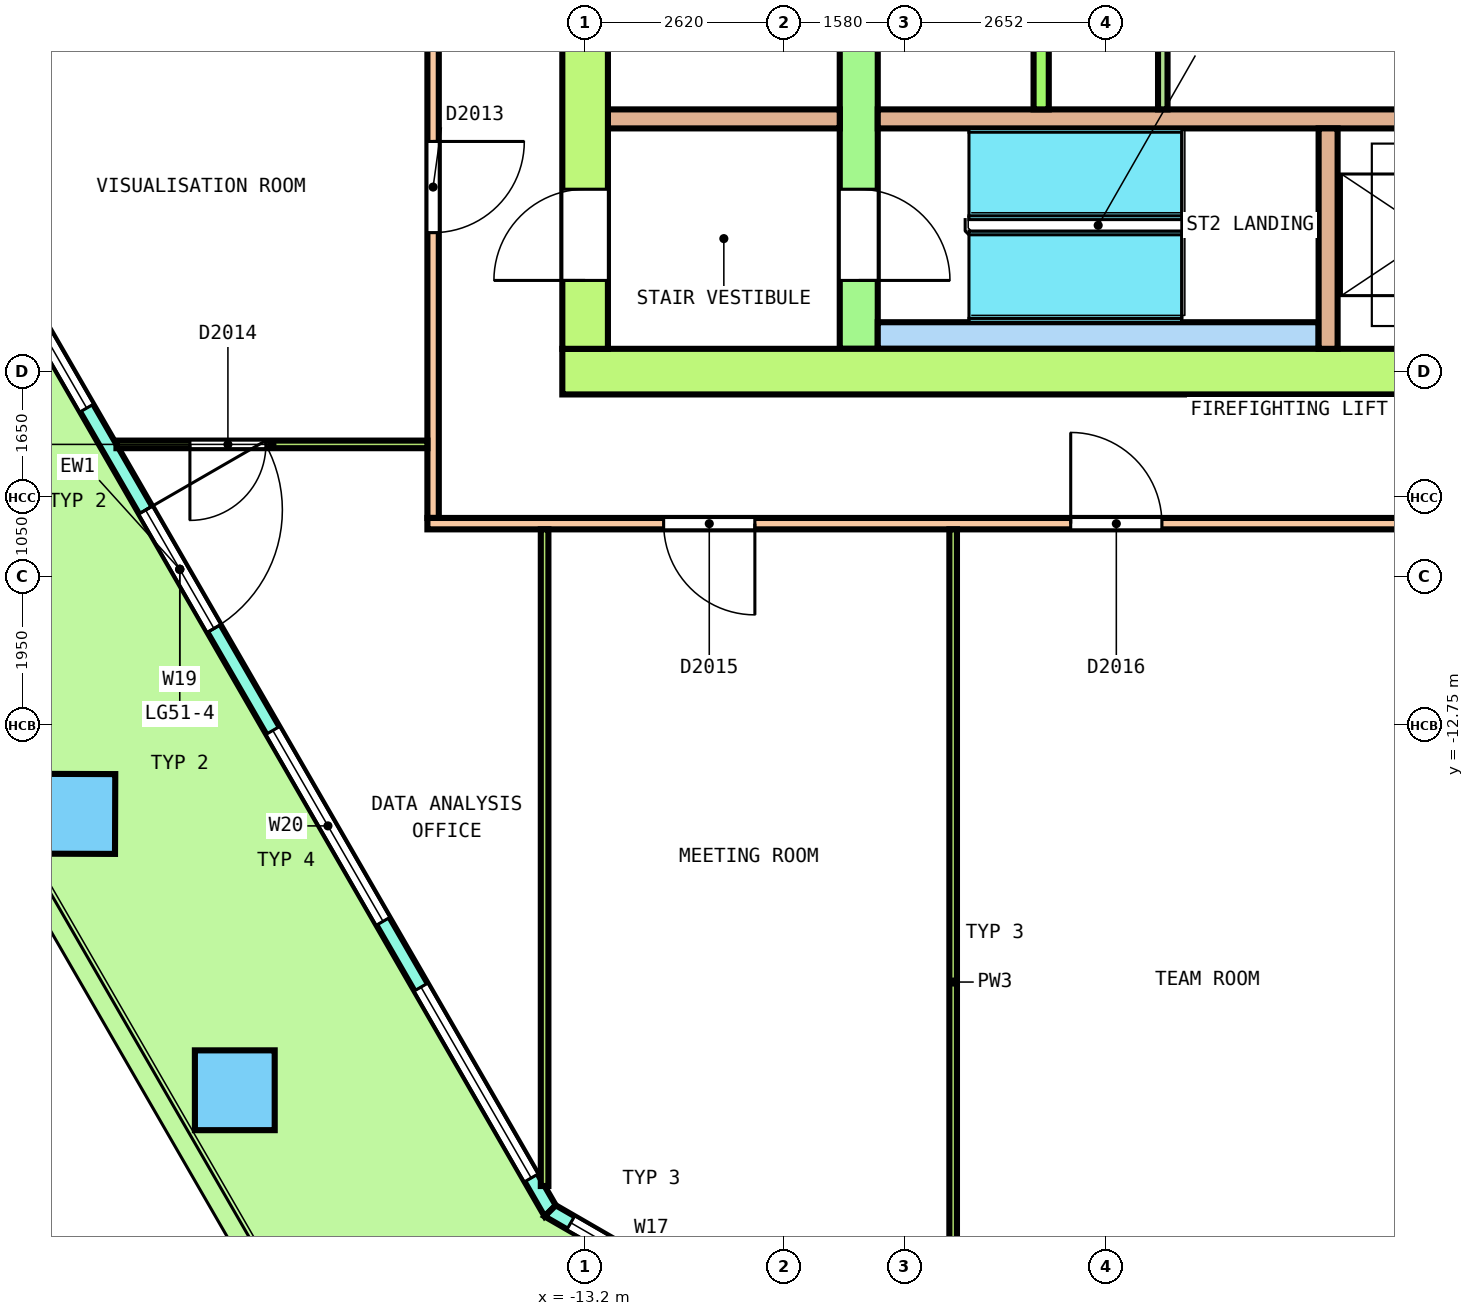
"""IFC4 building model, lengths in metres.
Left out: names, types, materials, properties, quantities, classifications, styles, units other than length and angle.
Written with IfcOpenShell. Run it as: python <this file> out.ifc"""

import sys

from ifc_helpers import new_model, si_unit, direction, frame, frame_2d, origin, origin_2d, place, context, subcontext, project, spatial, polyline, rectangle, outline, extrude, element, fill, save


model = new_model("IFC4")
c1 = context("Model", 3, precision=1e-05, world=origin(), true_north=direction((0.0, 1.0)))
c2 = subcontext(c1, "Body", "Model", "MODEL_VIEW")
j1 = project(units=[si_unit("LENGTHUNIT", "METRE"), si_unit("PLANEANGLEUNIT", "RADIAN")], contexts=[c1])
p1 = place(None, origin())
s1 = spatial("IfcSite", under=j1, at=p1, CompositionType="ELEMENT")
p2 = place(p1, origin())
s2 = spatial("IfcBuilding", under=s1, at=p2, CompositionType="ELEMENT")
p3 = place(p2, frame((0.0, 0.0, 237.4)))
s3 = spatial("IfcBuildingStorey", under=s2, at=p3, CompositionType="ELEMENT", Elevation=237.4)
p4 = place(p3, frame((-19.908, -13.918, 0.0), z_axis=(0.003611705113, -0.006220158806, 0.999974132271), x_axis=(0.499321585349, -0.866386876722, -0.007192652341)))
e1 = element("IfcColumn", 1, at=p4, inside=s3, PredefinedType="COLUMN", context=c2, shape_type="SweptSolid", body=[
    extrude(rectangle(XDim=1.05, YDim=1.05, at=origin_2d()), origin(), (0.0, 0.0, 1.0), 3.65),
])
p5 = place(p3, frame((-17.809, -17.554, 0.0), z_axis=(0.010899694483, -0.018857140148, 0.999762774325), x_axis=(0.500590334681, -0.865410262129, -0.021780611228)))
e2 = element("IfcColumn", 2, at=p5, inside=s3, PredefinedType="COLUMN", context=c2, shape_type="SweptSolid", body=[
    extrude(rectangle(XDim=1.05, YDim=1.05, at=origin_2d()), origin(), (0.0, 0.0, 1.0), 3.651),
])
p6 = place(p3, frame((-23.406, -2.26, 0.0), z_axis=(0.0, 0.0, 1.0), x_axis=(0.500001086243, -0.866024776641, 0.0)))
e3 = element("IfcWall", 3, at=p6, inside=s3, PredefinedType="SOLIDWALL", context=c2, shape_type="SweptSolid", body=[
    extrude(outline(polyline([(-0.027, -0.1), (1.002, -0.1), (2.031, -0.1), (3.059, -0.1), (4.088, -0.1), (5.117, -0.1), (6.146, -0.1), (7.175, -0.1), (8.203, -0.1), (9.232, -0.1), (10.261, -0.1), (11.29, -0.1), (12.318, -0.1), (13.347, -0.1), (14.376, -0.1), (15.405, -0.1), (16.433, -0.1), (17.462, -0.1), (18.491, -0.1), (19.52, -0.1), (19.466, 0.1), (18.443, 0.1), (17.42, 0.1), (16.396, 0.1), (15.373, 0.1), (14.35, 0.1), (13.327, 0.1), (12.304, 0.1), (11.281, 0.1), (10.258, 0.1), (9.235, 0.1), (8.212, 0.1), (7.188, 0.1), (6.166, 0.1), (5.142, 0.1), (4.119, 0.1), (3.096, 0.1), (2.073, 0.1), (1.05, 0.1), (0.027, 0.1), (-0.027, -0.1)])), origin(), (0.0, 0.0, 1.0), 3.7),
])
p7 = place(p6, frame((0.499, 0.0, 0.1)))
e4 = element("IfcOpeningElement", 4, at=p7, cuts=e3, PredefinedType="OPENING", context=c2, shape_type="SweptSolid", body=[
    extrude(rectangle(XDim=2.9, YDim=2.65, at=frame_2d((1.45, 1.325))), frame((0.0, 0.11, 0.0), z_axis=(0.0, -1.0, 0.0), x_axis=(1.0, 0.0, 0.0)), (0.0, 0.0, 1.0), 0.22),
])
p8 = place(p6, frame((4.398, 0.0, 0.1)))
e5 = element("IfcOpeningElement", 5, at=p8, cuts=e3, PredefinedType="OPENING", context=c2, shape_type="SweptSolid", body=[
    extrude(rectangle(XDim=2.9, YDim=2.65, at=frame_2d((1.45, 1.325))), frame((0.0, 0.11, 0.0), z_axis=(0.0, -1.0, 0.0), x_axis=(1.0, 0.0, 0.0)), (0.0, 0.0, 1.0), 0.22),
])
p9 = place(p6, frame((8.846, 0.0, 0.0)))
e6 = element("IfcOpeningElement", 6, at=p9, cuts=e3, PredefinedType="OPENING", context=c2, shape_type="SweptSolid", body=[
    extrude(rectangle(XDim=1.8, YDim=2.4, at=frame_2d((0.9, 1.2))), frame((0.0, 0.11, 0.0), z_axis=(0.0, -1.0, 0.0), x_axis=(1.0, 0.0, 0.0)), (0.0, 0.0, 1.0), 0.22),
])
p10 = place(p6, frame((8.846, 0.0, 2.55)))
e7 = element("IfcOpeningElement", 7, at=p10, cuts=e3, PredefinedType="OPENING", context=c2, shape_type="SweptSolid", body=[
    extrude(rectangle(XDim=1.8, YDim=0.2, at=frame_2d((0.9, 0.1))), frame((0.0, 0.11, 0.0), z_axis=(0.0, -1.0, 0.0), x_axis=(1.0, 0.0, 0.0)), (0.0, 0.0, 1.0), 0.22),
])
p11 = place(p6, frame((12.195, 0.0, 0.1)))
e8 = element("IfcOpeningElement", 8, at=p11, cuts=e3, PredefinedType="OPENING", context=c2, shape_type="SweptSolid", body=[
    extrude(rectangle(XDim=2.9, YDim=2.65, at=frame_2d((1.45, 1.325))), frame((0.0, 0.11, 0.0), z_axis=(0.0, -1.0, 0.0), x_axis=(1.0, 0.0, 0.0)), (0.0, 0.0, 1.0), 0.22),
])
p12 = place(p6, frame((16.094, 0.0, 0.1)))
e9 = element("IfcOpeningElement", 9, at=p12, cuts=e3, PredefinedType="OPENING", context=c2, shape_type="SweptSolid", body=[
    extrude(rectangle(XDim=2.9, YDim=2.65, at=frame_2d((1.45, 1.325))), frame((0.0, 0.11, 0.0), z_axis=(0.0, -1.0, 0.0), x_axis=(1.0, 0.0, 0.0)), (0.0, 0.0, 1.0), 0.22),
])
p13 = place(p3, frame((-13.66, -19.141, 0.0), z_axis=(0.0, 0.0, 1.0), x_axis=(0.866019727221, -0.500009831968, 0.0)))
e10 = element("IfcWall", 10, at=p13, inside=s3, PredefinedType="SOLIDWALL", context=c2, shape_type="SweptSolid", body=[
    extrude(outline(polyline([(-0.027, -0.1), (1.008, -0.1), (2.042, -0.1), (3.076, -0.1), (4.111, -0.1), (5.145, -0.1), (6.18, -0.1), (6.126, 0.1), (5.109, 0.1), (4.093, 0.1), (3.076, 0.1), (2.06, 0.1), (1.043, 0.1), (0.027, 0.1), (-0.027, -0.1)])), origin(), (0.0, 0.0, 1.0), 3.7),
])
p14 = place(p13, frame((0.313, 0.0, 0.1)))
e11 = element("IfcOpeningElement", 11, at=p14, cuts=e10, PredefinedType="OPENING", context=c2, shape_type="SweptSolid", body=[
    extrude(rectangle(XDim=2.45, YDim=2.65, at=frame_2d((1.225, 1.325))), frame((0.0, 0.11, 0.0), z_axis=(0.0, -1.0, 0.0), x_axis=(1.0, 0.0, 0.0)), (0.0, 0.0, 1.0), 0.22),
])
p15 = place(p13, frame((3.39, 0.0, 0.1)))
e12 = element("IfcOpeningElement", 12, at=p15, cuts=e10, PredefinedType="OPENING", context=c2, shape_type="SweptSolid", body=[
    extrude(rectangle(XDim=2.45, YDim=2.65, at=frame_2d((1.225, 1.325))), frame((0.0, 0.11, 0.0), z_axis=(0.0, -1.0, 0.0), x_axis=(1.0, 0.0, 0.0)), (0.0, 0.0, 1.0), 0.22),
])
p16 = place(p3, frame((-13.5, -8.1, 0.0), z_axis=(0.0, 0.0, 1.0), x_axis=(1.0, 0.0, 0.0)))
e13 = element("IfcWall", 13, at=p16, inside=s3, PredefinedType="SHEAR", context=c2, shape_type="SweptSolid", body=[
    extrude(rectangle(XDim=27.0, YDim=0.6, at=frame_2d((13.5, 0.0))), origin(), (0.0, 0.0, 1.0), 3.7),
])
p17 = place(p16, frame((15.05, 0.0, 0.0)))
e14 = element("IfcOpeningElement", 14, at=p17, cuts=e13, PredefinedType="OPENING", context=c2, shape_type="SweptSolid", body=[
    extrude(rectangle(XDim=1.2, YDim=2.1, at=frame_2d((0.6, 1.05))), frame((0.0, 0.31, 0.0), z_axis=(0.0, -1.0, 0.0), x_axis=(1.0, 0.0, 0.0)), (0.0, 0.0, 1.0), 0.62),
])
p18 = place(p3, frame((-13.2, -7.8, 0.0), z_axis=(0.0, 0.0, 1.0), x_axis=(0.0, 1.0, 0.0)))
e15 = element("IfcWall", 15, at=p18, inside=s3, PredefinedType="SHEAR", context=c2, shape_type="SweptSolid", body=[
    extrude(rectangle(XDim=15.6, YDim=0.6, at=frame_2d((7.8, 0.0))), origin(), (0.0, 0.0, 1.0), 3.7),
])
p19 = place(p18, frame((6.6, 0.0, 0.0)))
e16 = element("IfcOpeningElement", 16, at=p19, cuts=e15, PredefinedType="OPENING", context=c2, shape_type="SweptSolid", body=[
    extrude(rectangle(XDim=2.4, YDim=2.1, at=frame_2d((1.2, 1.05))), frame((0.0, 0.31, 0.0), z_axis=(0.0, -1.0, 0.0), x_axis=(1.0, 0.0, 0.0)), (0.0, 0.0, 1.0), 0.62),
])
p20 = place(p18, frame((13.5, 0.0, 0.0)))
e17 = element("IfcOpeningElement", 17, at=p20, cuts=e15, PredefinedType="OPENING", context=c2, shape_type="SweptSolid", body=[
    extrude(rectangle(XDim=1.2, YDim=2.1, at=frame_2d((0.6, 1.05))), frame((0.0, 0.31, 0.0), z_axis=(0.0, -1.0, 0.0), x_axis=(1.0, 0.0, 0.0)), (0.0, 0.0, 1.0), 0.62),
])
p21 = place(p18, frame((0.9, 0.0, 0.0)))
e18 = element("IfcOpeningElement", 18, at=p21, cuts=e15, PredefinedType="OPENING", context=c2, shape_type="SweptSolid", body=[
    extrude(rectangle(XDim=1.2, YDim=2.1, at=frame_2d((0.6, 1.05))), frame((0.0, 0.31, 0.0), z_axis=(0.0, -1.0, 0.0), x_axis=(1.0, 0.0, 0.0)), (0.0, 0.0, 1.0), 0.62),
])
p22 = place(p3, frame((-9.6, -7.8, 0.0), z_axis=(0.0, 0.0, 1.0), x_axis=(0.0, 1.0, 0.0)))
e19 = element("IfcWall", 19, at=p22, inside=s3, PredefinedType="SHEAR", context=c2, shape_type="SweptSolid", body=[
    extrude(rectangle(XDim=15.6, YDim=0.5, at=frame_2d((7.8, 0.0))), origin(), (0.0, 0.0, 1.0), 3.7),
])
p23 = place(p22, frame((6.6, 0.0, 0.0)))
e20 = element("IfcOpeningElement", 20, at=p23, cuts=e19, PredefinedType="OPENING", context=c2, shape_type="SweptSolid", body=[
    extrude(rectangle(XDim=2.4, YDim=2.1, at=frame_2d((1.2, 1.05))), frame((0.0, 0.26, 0.0), z_axis=(0.0, -1.0, 0.0), x_axis=(1.0, 0.0, 0.0)), (0.0, 0.0, 1.0), 0.52),
])
p24 = place(p22, frame((13.5, 0.0, 0.0)))
e21 = element("IfcOpeningElement", 21, at=p24, cuts=e19, PredefinedType="OPENING", context=c2, shape_type="SweptSolid", body=[
    extrude(rectangle(XDim=1.2, YDim=2.1, at=frame_2d((0.6, 1.05))), frame((0.0, 0.26, 0.0), z_axis=(0.0, -1.0, 0.0), x_axis=(1.0, 0.0, 0.0)), (0.0, 0.0, 1.0), 0.52),
])
p25 = place(p22, frame((0.9, 0.0, 0.0)))
e22 = element("IfcOpeningElement", 22, at=p25, cuts=e19, PredefinedType="OPENING", context=c2, shape_type="SweptSolid", body=[
    extrude(rectangle(XDim=1.2, YDim=2.1, at=frame_2d((0.6, 1.05))), frame((0.0, 0.26, 0.0), z_axis=(0.0, -1.0, 0.0), x_axis=(1.0, 0.0, 0.0)), (0.0, 0.0, 1.0), 0.52),
])
p26 = place(p3, frame((-12.9, -4.775, 0.0), z_axis=(0.0, 0.0, 1.0), x_axis=(1.0, 0.0, 0.0)))
e23 = element("IfcWall", 23, at=p26, inside=s3, PredefinedType="SOLIDWALL", context=c2, shape_type="SweptSolid", body=[
    extrude(rectangle(XDim=3.05, YDim=0.25, at=frame_2d((1.525, 0.0))), origin(), (0.0, 0.0, 1.0), 3.7),
])
p27 = place(p3, frame((-9.35, -4.775, 0.0), z_axis=(0.0, 0.0, 1.0), x_axis=(1.0, 0.0, 0.0)))
e24 = element("IfcWall", 24, at=p27, inside=s3, PredefinedType="SOLIDWALL", context=c2, shape_type="SweptSolid", body=[
    extrude(rectangle(XDim=18.7, YDim=0.25, at=frame_2d((9.35, 0.0))), origin(), (0.0, 0.0, 1.0), 3.7),
])
p28 = place(p3, frame((-7.2, -4.65, 0.0), z_axis=(0.0, 0.0, 1.0), x_axis=(0.0, 1.0, 0.0)))
e25 = element("IfcWall", 25, at=p28, inside=s3, PredefinedType="SOLIDWALL", context=c2, shape_type="SweptSolid", body=[
    extrude(rectangle(XDim=2.9, YDim=0.2, at=frame_2d((1.45, 0.0))), origin(), (0.0, 0.0, 1.0), 3.7),
])
p29 = place(p3, frame((-9.35, -7.625, 0.0), z_axis=(0.0, 0.0, 1.0), x_axis=(1.0, 0.0, 0.0)))
e26 = element("IfcWall", 26, at=p29, inside=s3, PredefinedType="SOLIDWALL", context=c2, shape_type="SweptSolid", body=[
    extrude(rectangle(XDim=5.8, YDim=0.35, at=frame_2d((2.9, 0.0))), origin(), (0.0, 0.0, 1.0), 3.7),
])
p30 = place(p3, frame((-3.425, -7.8, 0.0), z_axis=(0.0, 0.0, 1.0), x_axis=(0.0, 1.0, 0.0)))
e27 = element("IfcWall", 27, at=p30, inside=s3, PredefinedType="SOLIDWALL", context=c2, shape_type="SweptSolid", body=[
    extrude(rectangle(XDim=2.9, YDim=0.25, at=frame_2d((1.45, 0.0))), origin(), (0.0, 0.0, 1.0), 3.7),
])
p31 = place(p3, frame((-5.6, -4.65, 0.0), z_axis=(0.0, 0.0, 1.0), x_axis=(0.0, 1.0, 0.0)))
e28 = element("IfcWall", 28, at=p31, inside=s3, PredefinedType="PARTITIONING", context=c2, shape_type="SweptSolid", body=[
    extrude(rectangle(XDim=2.9, YDim=0.125, at=frame_2d((1.45, 0.0))), origin(), (0.0, 0.0, 1.0), 3.7),
])
p32 = place(p3, frame((-15.2, -10.025, 0.0), z_axis=(0.0, 0.0, 1.0), x_axis=(0.0, 1.0, 0.0)))
e29 = element("IfcWall", 29, at=p32, inside=s3, PredefinedType="PARTITIONING", context=c2, shape_type="SweptSolid", body=[
    extrude(rectangle(XDim=17.25, YDim=0.15, at=frame_2d((8.625, 0.0))), origin(), (0.0, 0.0, 1.0), 2.8),
])
p33 = place(p32, frame((10.727, 0.0, 0.0)))
e30 = element("IfcOpeningElement", 30, at=p33, cuts=e29, PredefinedType="OPENING", context=c2, shape_type="SweptSolid", body=[
    extrude(rectangle(XDim=1.2, YDim=2.1, at=frame_2d((0.6, 1.05))), frame((0.0, 0.085, 0.0), z_axis=(0.0, -1.0, 0.0), x_axis=(1.0, 0.0, 0.0)), (0.0, 0.0, 1.0), 0.17),
])
p34 = place(p32, frame((3.753, 0.0, 0.0)))
e31 = element("IfcOpeningElement", 31, at=p34, cuts=e29, PredefinedType="OPENING", context=c2, shape_type="SweptSolid", body=[
    extrude(rectangle(XDim=1.2, YDim=2.1, at=frame_2d((0.6, 1.05))), frame((0.0, 0.085, 0.0), z_axis=(0.0, -1.0, 0.0), x_axis=(1.0, 0.0, 0.0)), (0.0, 0.0, 1.0), 0.17),
])
p35 = place(p3, frame((-15.275, -10.1, 0.0), z_axis=(0.0, 0.0, 1.0), x_axis=(1.0, 0.0, 0.0)))
e32 = element("IfcWall", 32, at=p35, inside=s3, PredefinedType="PARTITIONING", context=c2, shape_type="SweptSolid", body=[
    extrude(rectangle(XDim=30.55, YDim=0.15, at=frame_2d((15.275, 0.0))), origin(), (0.0, 0.0, 1.0), 2.8),
])
p36 = place(p35, frame((3.108, 0.0, 0.0)))
e33 = element("IfcOpeningElement", 33, at=p36, cuts=e32, PredefinedType="OPENING", context=c2, shape_type="SweptSolid", body=[
    extrude(rectangle(XDim=1.2, YDim=2.1, at=frame_2d((0.6, 1.05))), frame((0.0, 0.085, 0.0), z_axis=(0.0, -1.0, 0.0), x_axis=(1.0, 0.0, 0.0)), (0.0, 0.0, 1.0), 0.17),
])
p37 = place(p35, frame((8.464, 0.0, 0.0)))
e34 = element("IfcOpeningElement", 34, at=p37, cuts=e32, PredefinedType="OPENING", context=c2, shape_type="SweptSolid", body=[
    extrude(rectangle(XDim=1.2, YDim=2.1, at=frame_2d((0.6, 1.05))), frame((0.0, 0.085, 0.0), z_axis=(0.0, -1.0, 0.0), x_axis=(1.0, 0.0, 0.0)), (0.0, 0.0, 1.0), 0.17),
])
p38 = place(p35, frame((15.2, 0.0, 0.0)))
e35 = element("IfcOpeningElement", 35, at=p38, cuts=e32, PredefinedType="OPENING", context=c2, shape_type="SweptSolid", body=[
    extrude(rectangle(XDim=1.0, YDim=2.1, at=frame_2d((0.5, 1.05))), frame((0.0, 0.085, 0.0), z_axis=(0.0, -1.0, 0.0), x_axis=(1.0, 0.0, 0.0)), (0.0, 0.0, 1.0), 0.17),
])
p39 = place(p35, frame((23.325, 0.0, 0.0)))
e36 = element("IfcOpeningElement", 36, at=p39, cuts=e32, PredefinedType="OPENING", context=c2, shape_type="SweptSolid", body=[
    extrude(rectangle(XDim=1.2, YDim=2.1, at=frame_2d((0.6, 1.05))), frame((0.0, 0.085, 0.0), z_axis=(0.0, -1.0, 0.0), x_axis=(1.0, 0.0, 0.0)), (0.0, 0.0, 1.0), 0.17),
])
p40 = place(p35, frame((28.511, 0.0, 0.0)))
e37 = element("IfcOpeningElement", 37, at=p40, cuts=e32, PredefinedType="OPENING", context=c2, shape_type="SweptSolid", body=[
    extrude(rectangle(XDim=1.0, YDim=2.1, at=frame_2d((0.5, 1.05))), frame((0.0, 0.085, 0.0), z_axis=(0.0, -1.0, 0.0), x_axis=(1.0, 0.0, 0.0)), (0.0, 0.0, 1.0), 0.17),
])
p41 = place(p3, frame((-19.366, -9.057, 0.0), z_axis=(0.0, 0.0, 1.0), x_axis=(1.0, 0.0, 0.0)))
e38 = element("IfcWall", 38, at=p41, inside=s3, PredefinedType="PARTITIONING", context=c2, shape_type="SweptSolid", body=[
    extrude(rectangle(XDim=4.091, YDim=0.1, at=frame_2d((2.045, 0.0))), origin(), (0.0, 0.0, 1.0), 2.8),
])
p42 = place(p41, frame((0.967, 0.0, 0.0)))
e39 = element("IfcOpeningElement", 39, at=p42, cuts=e38, PredefinedType="OPENING", context=c2, shape_type="SweptSolid", body=[
    extrude(rectangle(XDim=1.0, YDim=2.1, at=frame_2d((0.5, 1.05))), frame((0.0, 0.06, 0.0), z_axis=(0.0, -1.0, 0.0), x_axis=(1.0, 0.0, 0.0)), (0.0, 0.0, 1.0), 0.12),
])
p43 = place(p3, frame((-13.733, -18.814, 0.0), z_axis=(0.0, 0.0, 1.0), x_axis=(0.0, 1.0, 0.0)))
e40 = element("IfcWall", 40, at=p43, inside=s3, PredefinedType="PARTITIONING", context=c2, shape_type="SweptSolid", body=[
    extrude(rectangle(XDim=8.639, YDim=0.1, at=frame_2d((4.319, 0.0))), origin(), (0.0, 0.0, 1.0), 2.8),
])
p44 = place(p3, frame((-8.358, -22.086, 0.0), z_axis=(0.0, 0.0, 1.0), x_axis=(0.0, 1.0, 0.0)))
e41 = element("IfcWall", 41, at=p44, inside=s3, PredefinedType="PARTITIONING", context=c2, shape_type="SweptSolid", body=[
    extrude(rectangle(XDim=11.911, YDim=0.1, at=frame_2d((5.956, 0.0))), origin(), (0.0, 0.0, 1.0), 2.8),
])
p45 = place(p8, origin())
e42 = element("IfcWindow", 42, at=p45, inside=s3, PartitioningType="SINGLE_PANEL", PredefinedType="WINDOW", context=c2, shape_type="SweptSolid", body=[
    extrude(rectangle(XDim=2.9, YDim=2.65, at=frame_2d((1.45, 1.325))), frame((0.0, 0.03, 0.0), z_axis=(0.0, -1.0, 0.0), x_axis=(1.0, 0.0, 0.0)), (0.0, 0.0, 1.0), 0.06),
])
fill(e5, e42)
p46 = place(p9, origin())
e43 = element("IfcDoor", 43, at=p46, inside=s3, OperationType="DOUBLE_DOOR_SINGLE_SWING", PredefinedType="DOOR", context=c2, shape_type="SweptSolid", body=[
    extrude(rectangle(XDim=1.8, YDim=2.4, at=frame_2d((0.9, 1.2))), frame((0.0, 0.025, 0.0), z_axis=(0.0, -1.0, 0.0), x_axis=(1.0, 0.0, 0.0)), (0.0, 0.0, 1.0), 0.05),
])
fill(e6, e43)
p47 = place(p10, origin())
e44 = element("IfcWindow", 44, at=p47, inside=s3, PartitioningType="SINGLE_PANEL", PredefinedType="WINDOW", context=c2, shape_type="SweptSolid", body=[
    extrude(rectangle(XDim=1.8, YDim=0.2, at=frame_2d((0.9, 0.1))), frame((0.0, 0.03, 0.0), z_axis=(0.0, -1.0, 0.0), x_axis=(1.0, 0.0, 0.0)), (0.0, 0.0, 1.0), 0.06),
])
fill(e7, e44)
p48 = place(p11, origin())
e45 = element("IfcWindow", 45, at=p48, inside=s3, PartitioningType="SINGLE_PANEL", PredefinedType="WINDOW", context=c2, shape_type="SweptSolid", body=[
    extrude(rectangle(XDim=2.9, YDim=2.65, at=frame_2d((1.45, 1.325))), frame((0.0, 0.03, 0.0), z_axis=(0.0, -1.0, 0.0), x_axis=(1.0, 0.0, 0.0)), (0.0, 0.0, 1.0), 0.06),
])
fill(e8, e45)
p49 = place(p12, origin())
e46 = element("IfcWindow", 46, at=p49, inside=s3, PartitioningType="SINGLE_PANEL", PredefinedType="WINDOW", context=c2, shape_type="SweptSolid", body=[
    extrude(rectangle(XDim=2.9, YDim=2.65, at=frame_2d((1.45, 1.325))), frame((0.0, 0.03, 0.0), z_axis=(0.0, -1.0, 0.0), x_axis=(1.0, 0.0, 0.0)), (0.0, 0.0, 1.0), 0.06),
])
fill(e9, e46)
p50 = place(p14, origin())
e47 = element("IfcWindow", 47, at=p50, inside=s3, PartitioningType="SINGLE_PANEL", PredefinedType="WINDOW", context=c2, shape_type="SweptSolid", body=[
    extrude(rectangle(XDim=2.45, YDim=2.65, at=frame_2d((1.225, 1.325))), frame((0.0, 0.03, 0.0), z_axis=(0.0, -1.0, 0.0), x_axis=(1.0, 0.0, 0.0)), (0.0, 0.0, 1.0), 0.06),
])
fill(e11, e47)
p51 = place(p25, origin())
e48 = element("IfcDoor", 48, at=p51, inside=s3, OperationType="SINGLE_SWING_RIGHT", PredefinedType="DOOR", context=c2, shape_type="SweptSolid", body=[
    extrude(rectangle(XDim=1.2, YDim=2.1, at=frame_2d((0.6, 1.05))), frame((0.0, 0.2, 0.0), z_axis=(0.0, -1.0, 0.0), x_axis=(1.0, 0.0, 0.0)), (0.0, 0.0, 1.0), 0.4),
])
fill(e22, e48)
p52 = place(p21, origin())
e49 = element("IfcDoor", 49, at=p52, inside=s3, OperationType="SINGLE_SWING_LEFT", PredefinedType="DOOR", context=c2, shape_type="SweptSolid", body=[
    extrude(rectangle(XDim=1.2, YDim=2.1, at=frame_2d((0.6, 1.05))), frame((0.0, 0.25, 0.0), z_axis=(0.0, -1.0, 0.0), x_axis=(1.0, 0.0, 0.0)), (0.0, 0.0, 1.0), 0.5),
])
fill(e18, e49)
p53 = place(p34, origin())
e50 = element("IfcDoor", 50, at=p53, inside=s3, OperationType="DOUBLE_DOOR_SINGLE_SWING", PredefinedType="DOOR", context=c2, shape_type="SweptSolid", body=[
    extrude(rectangle(XDim=1.2, YDim=2.1, at=frame_2d((0.6, 1.05))), frame((0.0, 0.025, 0.0), z_axis=(0.0, -1.0, 0.0), x_axis=(1.0, 0.0, 0.0)), (0.0, 0.0, 1.0), 0.05),
])
fill(e31, e50)
p54 = place(p42, origin())
e51 = element("IfcDoor", 51, at=p54, inside=s3, OperationType="SINGLE_SWING_LEFT", PredefinedType="DOOR", context=c2, shape_type="SweptSolid", body=[
    extrude(rectangle(XDim=1.0, YDim=2.1, at=frame_2d((0.5, 1.05))), frame((0.0, 0.025, 0.0), z_axis=(0.0, -1.0, 0.0), x_axis=(1.0, 0.0, 0.0)), (0.0, 0.0, 1.0), 0.05),
])
fill(e39, e51)
p55 = place(p36, origin())
e52 = element("IfcDoor", 52, at=p55, inside=s3, OperationType="DOUBLE_DOOR_SINGLE_SWING", PredefinedType="DOOR", context=c2, shape_type="SweptSolid", body=[
    extrude(rectangle(XDim=1.2, YDim=2.1, at=frame_2d((0.6, 1.05))), frame((0.0, 0.025, 0.0), z_axis=(0.0, -1.0, 0.0), x_axis=(1.0, 0.0, 0.0)), (0.0, 0.0, 1.0), 0.05),
])
fill(e33, e52)
p56 = place(p37, origin())
e53 = element("IfcDoor", 53, at=p56, inside=s3, OperationType="DOUBLE_DOOR_SINGLE_SWING", PredefinedType="DOOR", context=c2, shape_type="SweptSolid", body=[
    extrude(rectangle(XDim=1.2, YDim=2.1, at=frame_2d((0.6, 1.05))), frame((0.0, 0.025, 0.0), z_axis=(0.0, -1.0, 0.0), x_axis=(1.0, 0.0, 0.0)), (0.0, 0.0, 1.0), 0.05),
])
fill(e34, e53)
save(model, sys.argv[1])
